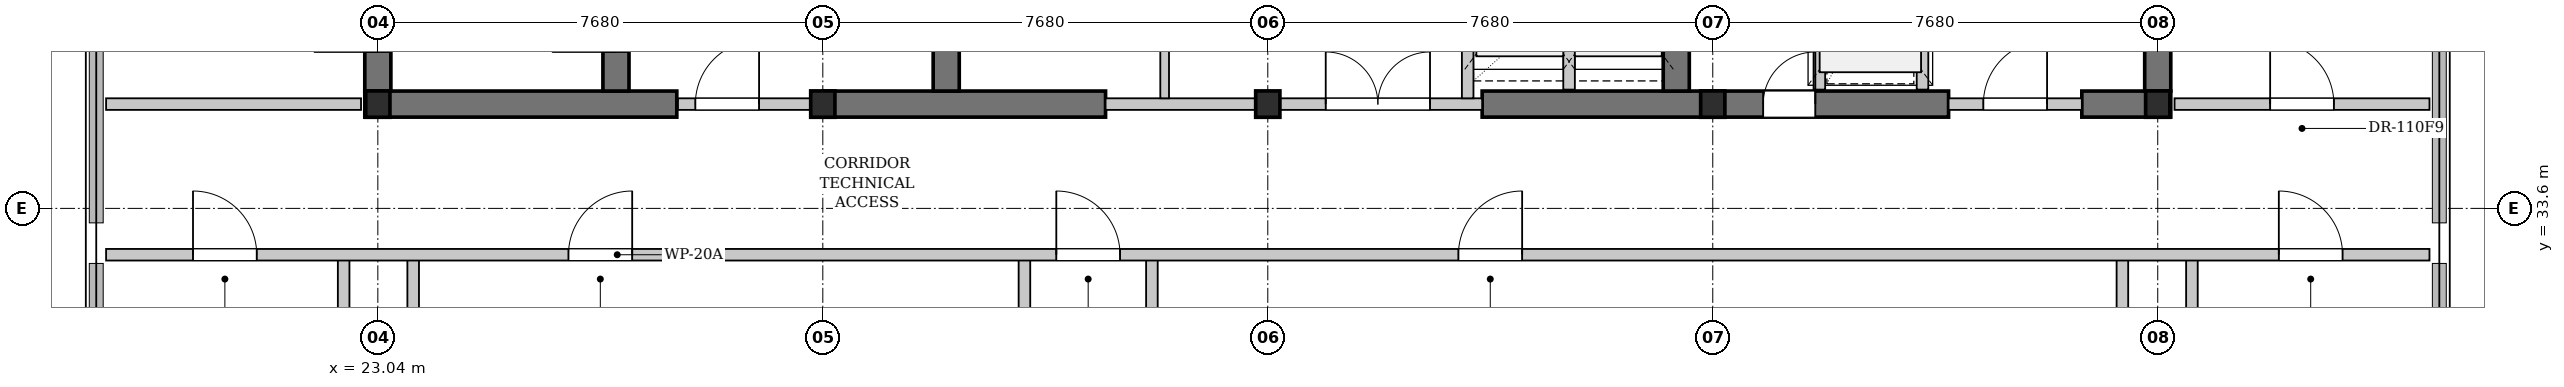
"""IFC4 building model, lengths in metres.
Left out: names, types, materials, properties, quantities, classifications, styles, units other than length and angle.
Written with IfcOpenShell. Run it as: python <this file> out.ifc"""

import sys

from ifc_helpers import new_model, si_unit, direction, frame, frame_2d, origin, origin_2d, place, context, subcontext, project, spatial, rectangle, i_section, extrude, element, fill, save


model = new_model("IFC4")
c1 = context("Model", 3, precision=1e-05, world=origin(), true_north=direction((0.0, 1.0)))
c2 = subcontext(c1, "Body", "Model", "MODEL_VIEW")
j1 = project(units=[si_unit("LENGTHUNIT", "METRE"), si_unit("PLANEANGLEUNIT", "RADIAN")], contexts=[c1])
p1 = place(None, origin())
s1 = spatial("IfcSite", under=j1, at=p1, CompositionType="ELEMENT")
p2 = place(p1, origin())
s2 = spatial("IfcBuilding", under=s1, at=p2, CompositionType="ELEMENT")
p3 = place(p2, frame((0.0, 0.0, 191.9)))
s3 = spatial("IfcBuildingStorey", under=s2, at=p3, CompositionType="ELEMENT", Elevation=191.9)
p4 = place(p3, frame((22.815, 35.4, 0.0), z_axis=(0.0, 0.0, 1.0), x_axis=(1.0, 0.0, 0.0)))
e1 = element("IfcWall", 1, at=p4, inside=s3, PredefinedType="SHEAR", context=c2, shape_type="SweptSolid", body=[
    extrude(rectangle(XDim=5.385, YDim=0.45, at=frame_2d((2.692, 0.0))), origin(), (0.0, 0.0, 1.0), 3.98),
])
p5 = place(p3, frame((30.72, 35.4, 0.0), z_axis=(0.0, 0.0, 1.0), x_axis=(1.0, 0.0, 0.0)))
e2 = element("IfcWall", 2, at=p5, inside=s3, PredefinedType="SHEAR", context=c2, shape_type="SweptSolid", body=[
    extrude(rectangle(XDim=4.88, YDim=0.45, at=frame_2d((2.44, 0.0))), origin(), (0.0, 0.0, 1.0), 3.98),
])
p6 = place(p3, frame((42.1, 35.4, 0.0), z_axis=(0.0, 0.0, 1.0), x_axis=(1.0, 0.0, 0.0)))
e3 = element("IfcWall", 3, at=p6, inside=s3, PredefinedType="SHEAR", context=c2, shape_type="SweptSolid", body=[
    extrude(rectangle(XDim=8.05, YDim=0.45, at=frame_2d((4.025, 0.0))), origin(), (0.0, 0.0, 1.0), 3.98),
])
p7 = place(p6, frame((4.85, 0.0, 0.0)))
e4 = element("IfcOpeningElement", 4, at=p7, cuts=e3, PredefinedType="OPENING", context=c2, shape_type="SweptSolid", body=[
    extrude(rectangle(XDim=0.9, YDim=2.15, at=frame_2d((0.45, 1.075))), frame((0.0, 0.235, 0.0), z_axis=(0.0, -1.0, 0.0), x_axis=(1.0, 0.0, 0.0)), (0.0, 0.0, 1.0), 0.47),
])
p8 = place(p3, frame((52.45, 35.4, 0.0), z_axis=(0.0, 0.0, 1.0), x_axis=(1.0, 0.0, 0.0)))
e5 = element("IfcWall", 5, at=p8, inside=s3, PredefinedType="SHEAR", context=c2, shape_type="SweptSolid", body=[
    extrude(rectangle(XDim=1.535, YDim=0.45, at=frame_2d((0.768, 0.0))), origin(), (0.0, 0.0, 1.0), 3.98),
])
p9 = place(p3, frame((23.04, 35.625, 0.0), z_axis=(0.0, 0.0, 1.0), x_axis=(0.0, 1.0, 0.0)))
e6 = element("IfcWall", 6, at=p9, inside=s3, PredefinedType="SHEAR", context=c2, shape_type="SweptSolid", body=[
    extrude(rectangle(XDim=10.35, YDim=0.45, at=frame_2d((5.175, 0.0))), origin(), (0.0, 0.0, 1.0), 3.98),
])
p10 = place(p9, frame((0.675, 0.0, 0.0)))
e7 = element("IfcOpeningElement", 7, at=p10, cuts=e6, PredefinedType="OPENING", context=c2, shape_type="SweptSolid", body=[
    extrude(rectangle(XDim=1.1, YDim=2.15, at=frame_2d((0.55, 1.075))), frame((0.0, 0.235, 0.0), z_axis=(0.0, -1.0, 0.0), x_axis=(1.0, 0.0, 0.0)), (0.0, 0.0, 1.0), 0.47),
])
p11 = place(p3, frame((27.15, 35.625, 0.0), z_axis=(0.0, 0.0, 1.0), x_axis=(0.0, 1.0, 0.0)))
e8 = element("IfcWall", 8, at=p11, inside=s3, PredefinedType="SHEAR", context=c2, shape_type="SweptSolid", body=[
    extrude(rectangle(XDim=10.35, YDim=0.45, at=frame_2d((5.175, 0.0))), origin(), (0.0, 0.0, 1.0), 3.98),
])
p12 = place(p11, frame((0.675, 0.0, 0.0)))
e9 = element("IfcOpeningElement", 9, at=p12, cuts=e8, PredefinedType="OPENING", context=c2, shape_type="SweptSolid", body=[
    extrude(rectangle(XDim=1.1, YDim=2.15, at=frame_2d((0.55, 1.075))), frame((0.0, 0.235, 0.0), z_axis=(0.0, -1.0, 0.0), x_axis=(1.0, 0.0, 0.0)), (0.0, 0.0, 1.0), 0.47),
])
for number, where, z_axis, x_axis in (
    (10, (32.85, 35.625, 0.0), (0.0, 0.0, 1.0), (0.0, 1.0, 0.0)),
    (11, (45.45, 35.625, 0.0), (0.0, 0.0, 1.0), (0.0, 1.0, 0.0)),
    (12, (53.76, 35.625, 0.0), (0.0, 0.0, 1.0), (0.0, 1.0, 0.0)),
):
    element("IfcWall", number, at=place(p3, frame(where, z_axis=z_axis, x_axis=x_axis)), inside=s3, PredefinedType="SHEAR", context=c2, shape_type="SweptSolid", body=[
        extrude(rectangle(XDim=10.35, YDim=0.45, at=frame_2d((5.175, 0.0))), origin(), (0.0, 0.0, 1.0), 3.98),
    ])
for number, where, z_axis, x_axis in (
    (13, (23.04, 35.4, 0.0), (0.0, 0.0, 1.0), (1.0, 0.0, 0.0)),
    (14, (30.72, 35.4, 0.0), (0.0, 0.0, 1.0), (1.0, 0.0, 0.0)),
    (15, (38.4, 35.4, 0.0), (0.0, 0.0, 1.0), (1.0, 0.0, 0.0)),
    (16, (46.08, 35.4, 0.0), (0.0, 0.0, 1.0), (1.0, 0.0, 0.0)),
    (17, (53.76, 35.4, 0.0), (0.0, 0.0, 1.0), (1.0, 0.0, 0.0)),
):
    element("IfcColumn", number, at=place(p3, frame(where, z_axis=z_axis, x_axis=x_axis)), inside=s3, PredefinedType="COLUMN", context=c2, shape_type="SweptSolid", body=[
        extrude(i_section(OverallWidth=0.418, OverallDepth=0.455, WebThickness=0.042, FlangeThickness=0.068, FilletRadius=0.015, at=origin_2d()), origin(), (0.0, 0.0, 1.0), 4.2),
    ])
p13 = place(p3, frame((28.22, 35.4, 0.0), z_axis=(0.0, 0.0, 1.0), x_axis=(1.0, 0.0, 0.0)))
e18 = element("IfcWall", 18, at=p13, inside=s3, PredefinedType="PARTITIONING", context=c2, shape_type="SweptSolid", body=[
    extrude(rectangle(XDim=2.5, YDim=0.2, at=frame_2d((1.25, 0.0))), origin(), (0.0, 0.0, 1.0), 3.161),
])
p14 = place(p13, frame((0.3, 0.0, 0.0)))
e19 = element("IfcOpeningElement", 19, at=p14, cuts=e18, PredefinedType="OPENING", context=c2, shape_type="SweptSolid", body=[
    extrude(rectangle(XDim=1.1, YDim=2.15, at=frame_2d((0.55, 1.075))), frame((0.0, 0.11, 0.0), z_axis=(0.0, -1.0, 0.0), x_axis=(1.0, 0.0, 0.0)), (0.0, 0.0, 1.0), 0.22),
])
p15 = place(p3, frame((35.6, 35.4, 0.0), z_axis=(0.0, 0.0, 1.0), x_axis=(1.0, 0.0, 0.0)))
e20 = element("IfcWall", 20, at=p15, inside=s3, PredefinedType="PARTITIONING", context=c2, shape_type="SweptSolid", body=[
    extrude(rectangle(XDim=6.5, YDim=0.2, at=frame_2d((3.25, 0.0))), origin(), (0.0, 0.0, 1.0), 3.161),
])
p16 = place(p15, frame((3.8, 0.0, 0.0)))
e21 = element("IfcOpeningElement", 21, at=p16, cuts=e20, PredefinedType="OPENING", context=c2, shape_type="SweptSolid", body=[
    extrude(rectangle(XDim=1.8, YDim=2.3, at=frame_2d((0.9, 1.15))), frame((0.0, 0.11, 0.0), z_axis=(0.0, -1.0, 0.0), x_axis=(1.0, 0.0, 0.0)), (0.0, 0.0, 1.0), 0.22),
])
p17 = place(p3, frame((36.62, 35.5, 0.0), z_axis=(0.0, 0.0, 1.0), x_axis=(0.0, 1.0, 0.0)))
e22 = element("IfcWall", 22, at=p17, inside=s3, PredefinedType="PARTITIONING", context=c2, shape_type="SweptSolid", body=[
    extrude(rectangle(XDim=10.42, YDim=0.15, at=frame_2d((5.21, 0.0))), origin(), (0.0, 0.0, 1.0), 3.98),
])
p18 = place(p17, frame((3.92, 0.0, 0.0)))
e23 = element("IfcOpeningElement", 23, at=p18, cuts=e22, PredefinedType="OPENING", context=c2, shape_type="SweptSolid", body=[
    extrude(rectangle(XDim=0.9, YDim=2.15, at=frame_2d((0.45, 1.075))), frame((0.0, 0.085, 0.0), z_axis=(0.0, -1.0, 0.0), x_axis=(1.0, 0.0, 0.0)), (0.0, 0.0, 1.0), 0.17),
])
p19 = place(p17, frame((5.85, 0.0, 0.0)))
e24 = element("IfcOpeningElement", 24, at=p19, cuts=e22, PredefinedType="OPENING", context=c2, shape_type="SweptSolid", body=[
    extrude(rectangle(XDim=0.9, YDim=2.15, at=frame_2d((0.45, 1.075))), frame((0.0, 0.085, 0.0), z_axis=(0.0, -1.0, 0.0), x_axis=(1.0, 0.0, 0.0)), (0.0, 0.0, 1.0), 0.17),
])
p20 = place(p3, frame((43.6, 35.65, 0.0), z_axis=(0.0, 0.0, 1.0), x_axis=(0.0, 1.0, 0.0)))
e25 = element("IfcWall", 25, at=p20, inside=s3, PredefinedType="PARTITIONING", context=c2, shape_type="SweptSolid", body=[
    extrude(rectangle(XDim=3.25, YDim=0.2, at=frame_2d((1.625, 0.0))), origin(), (0.0, 0.0, 1.0), 3.98),
])
p21 = place(p3, frame((41.85, 35.5, 0.0), z_axis=(0.0, 0.0, 1.0), x_axis=(0.0, 1.0, 0.0)))
e26 = element("IfcWall", 26, at=p21, inside=s3, PredefinedType="PARTITIONING", context=c2, shape_type="SweptSolid", body=[
    extrude(rectangle(XDim=3.4, YDim=0.2, at=frame_2d((1.7, 0.0))), origin(), (0.0, 0.0, 1.0), 3.98),
])
p22 = place(p3, frame((50.15, 35.4, 0.0), z_axis=(0.0, 0.0, 1.0), x_axis=(1.0, 0.0, 0.0)))
e27 = element("IfcWall", 27, at=p22, inside=s3, PredefinedType="PARTITIONING", context=c2, shape_type="SweptSolid", body=[
    extrude(rectangle(XDim=2.3, YDim=0.2, at=frame_2d((1.15, 0.0))), origin(), (0.0, 0.0, 1.0), 3.161),
])
p23 = place(p22, frame((0.6, 0.0, 0.0)))
e28 = element("IfcOpeningElement", 28, at=p23, cuts=e27, PredefinedType="OPENING", context=c2, shape_type="SweptSolid", body=[
    extrude(rectangle(XDim=1.1, YDim=2.15, at=frame_2d((0.55, 1.075))), frame((0.0, 0.11, 0.0), z_axis=(0.0, -1.0, 0.0), x_axis=(1.0, 0.0, 0.0)), (0.0, 0.0, 1.0), 0.22),
])
p24 = place(p3, frame((49.7, 35.65, 0.0), z_axis=(0.0, 0.0, 1.0), x_axis=(0.0, 1.0, 0.0)))
e29 = element("IfcWall", 29, at=p24, inside=s3, PredefinedType="PARTITIONING", context=c2, shape_type="SweptSolid", body=[
    extrude(rectangle(XDim=3.15, YDim=0.2, at=frame_2d((1.575, 0.0))), origin(), (0.0, 0.0, 1.0), 3.98),
])
p25 = place(p24, frame((0.85, 0.0, 0.0)))
e30 = element("IfcOpeningElement", 30, at=p25, cuts=e29, PredefinedType="OPENING", context=c2, shape_type="SweptSolid", body=[
    extrude(rectangle(XDim=1.2, YDim=2.2, at=frame_2d((0.6, 1.1))), frame((0.0, 0.11, 0.0), z_axis=(0.0, -1.0, 0.0), x_axis=(1.0, 0.0, 0.0)), (0.0, 0.0, 1.0), 0.22),
])
p26 = place(p3, frame((47.92, 35.65, 0.0), z_axis=(0.0, 0.0, 1.0), x_axis=(0.0, 1.0, 0.0)))
e31 = element("IfcWall", 31, at=p26, inside=s3, PredefinedType="PARTITIONING", context=c2, shape_type="SweptSolid", body=[
    extrude(rectangle(XDim=3.15, YDim=0.2, at=frame_2d((1.575, 0.0))), origin(), (0.0, 0.0, 1.0), 3.98),
])
p27 = place(p3, frame((18.35, 35.4, 0.0), z_axis=(0.0, 0.0, 1.0), x_axis=(1.0, 0.0, 0.0)))
e32 = element("IfcWall", 32, at=p27, inside=s3, PredefinedType="PARTITIONING", context=c2, shape_type="SweptSolid", body=[
    extrude(rectangle(XDim=4.4, YDim=0.2, at=frame_2d((2.2, 0.0))), origin(), (0.0, 0.0, 1.0), 3.98),
])
p28 = place(p3, frame((54.05, 35.4, 0.0), z_axis=(0.0, 0.0, 1.0), x_axis=(1.0, 0.0, 0.0)))
e33 = element("IfcWall", 33, at=p28, inside=s3, PredefinedType="PARTITIONING", context=c2, shape_type="SweptSolid", body=[
    extrude(rectangle(XDim=4.4, YDim=0.2, at=frame_2d((2.2, 0.0))), origin(), (0.0, 0.0, 1.0), 3.98),
])
p29 = place(p28, frame((1.65, 0.0, 0.0)))
e34 = element("IfcOpeningElement", 34, at=p29, cuts=e33, PredefinedType="OPENING", context=c2, shape_type="SweptSolid", body=[
    extrude(rectangle(XDim=1.1, YDim=2.15, at=frame_2d((0.55, 1.075))), frame((0.0, 0.11, 0.0), z_axis=(0.0, -1.0, 0.0), x_axis=(1.0, 0.0, 0.0)), (0.0, 0.0, 1.0), 0.22),
])
for number, where, z_axis, x_axis in (
    (35, (22.45, 23.58, 0.0), (0.0, 0.0, 1.0), (0.0, 1.0, 0.0)),
    (36, (23.65, 23.58, 0.0), (0.0, 0.0, 1.0), (0.0, 1.0, 0.0)),
    (37, (53.15, 23.58, 0.0), (0.0, 0.0, 1.0), (0.0, 1.0, 0.0)),
    (38, (54.35, 23.58, 0.0), (0.0, 0.0, 1.0), (0.0, 1.0, 0.0)),
):
    element("IfcWall", number, at=place(p3, frame(where, z_axis=z_axis, x_axis=x_axis)), inside=s3, PredefinedType="PARTITIONING", context=c2, shape_type="SweptSolid", body=[
        extrude(rectangle(XDim=9.22, YDim=0.2, at=frame_2d((4.61, 0.0))), origin(), (0.0, 0.0, 1.0), 3.98),
    ])
for number, where, z_axis, x_axis in (
    (39, (34.2, 24.85, 0.0), (0.0, 0.0, 1.0), (0.0, 1.0, 0.0)),
    (40, (36.4, 24.85, 0.0), (0.0, 0.0, 1.0), (0.0, 1.0, 0.0)),
):
    element("IfcWall", number, at=place(p3, frame(where, z_axis=z_axis, x_axis=x_axis)), inside=s3, PredefinedType="PARTITIONING", context=c2, shape_type="SweptSolid", body=[
        extrude(rectangle(XDim=7.95, YDim=0.2, at=frame_2d((3.975, 0.0))), origin(), (0.0, 0.0, 1.0), 3.98),
    ])
p30 = place(p3, frame((18.35, 32.8, 0.0), z_axis=(0.0, 0.0, 1.0), x_axis=(1.0, 0.0, 0.0)))
e41 = element("IfcWall", 41, at=p30, inside=s3, PredefinedType="PARTITIONING", context=c2, shape_type="SweptSolid", body=[
    extrude(rectangle(XDim=40.1, YDim=0.2, at=frame_2d((20.05, 0.0))), origin(), (0.0, 0.0, 1.0), 3.98),
])
p31 = place(p30, frame((1.5, 0.0, 0.0)))
e42 = element("IfcOpeningElement", 42, at=p31, cuts=e41, PredefinedType="OPENING", context=c2, shape_type="SweptSolid", body=[
    extrude(rectangle(XDim=1.1, YDim=2.15, at=frame_2d((0.55, 1.075))), frame((0.0, 0.11, 0.0), z_axis=(0.0, -1.0, 0.0), x_axis=(1.0, 0.0, 0.0)), (0.0, 0.0, 1.0), 0.22),
])
p32 = place(p30, frame((7.98, 0.0, 0.0)))
e43 = element("IfcOpeningElement", 43, at=p32, cuts=e41, PredefinedType="OPENING", context=c2, shape_type="SweptSolid", body=[
    extrude(rectangle(XDim=1.1, YDim=2.15, at=frame_2d((0.55, 1.075))), frame((0.0, 0.11, 0.0), z_axis=(0.0, -1.0, 0.0), x_axis=(1.0, 0.0, 0.0)), (0.0, 0.0, 1.0), 0.22),
])
p33 = place(p30, frame((16.4, 0.0, 0.0)))
e44 = element("IfcOpeningElement", 44, at=p33, cuts=e41, PredefinedType="OPENING", context=c2, shape_type="SweptSolid", body=[
    extrude(rectangle(XDim=1.1, YDim=2.15, at=frame_2d((0.55, 1.075))), frame((0.0, 0.11, 0.0), z_axis=(0.0, -1.0, 0.0), x_axis=(1.0, 0.0, 0.0)), (0.0, 0.0, 1.0), 0.22),
])
p34 = place(p30, frame((23.34, 0.0, 0.0)))
e45 = element("IfcOpeningElement", 45, at=p34, cuts=e41, PredefinedType="OPENING", context=c2, shape_type="SweptSolid", body=[
    extrude(rectangle(XDim=1.1, YDim=2.15, at=frame_2d((0.55, 1.075))), frame((0.0, 0.11, 0.0), z_axis=(0.0, -1.0, 0.0), x_axis=(1.0, 0.0, 0.0)), (0.0, 0.0, 1.0), 0.22),
])
p35 = place(p30, frame((37.5, 0.0, 0.0)))
e46 = element("IfcOpeningElement", 46, at=p35, cuts=e41, PredefinedType="OPENING", context=c2, shape_type="SweptSolid", body=[
    extrude(rectangle(XDim=1.1, YDim=2.15, at=frame_2d((0.55, 1.075))), frame((0.0, 0.11, 0.0), z_axis=(0.0, -1.0, 0.0), x_axis=(1.0, 0.0, 0.0)), (0.0, 0.0, 1.0), 0.22),
])
p36 = place(p14, origin())
e47 = element("IfcDoor", 47, at=p36, inside=s3, OperationType="SINGLE_SWING_RIGHT", PredefinedType="DOOR", context=c2, shape_type="SweptSolid", body=[
    extrude(rectangle(XDim=1.1, YDim=2.15, at=frame_2d((0.55, 1.075))), frame((0.0, 0.025, 0.0), z_axis=(0.0, -1.0, 0.0), x_axis=(1.0, 0.0, 0.0)), (0.0, 0.0, 1.0), 0.05),
])
fill(e19, e47)
p37 = place(p16, origin())
e48 = element("IfcDoor", 48, at=p37, inside=s3, OperationType="DOUBLE_DOOR_SINGLE_SWING", PredefinedType="DOOR", context=c2, shape_type="SweptSolid", body=[
    extrude(rectangle(XDim=1.8, YDim=2.3, at=frame_2d((0.9, 1.15))), frame((0.0, 0.025, 0.0), z_axis=(0.0, -1.0, 0.0), x_axis=(1.0, 0.0, 0.0)), (0.0, 0.0, 1.0), 0.05),
])
fill(e21, e48)
p38 = place(p23, origin())
e49 = element("IfcDoor", 49, at=p38, inside=s3, OperationType="SINGLE_SWING_RIGHT", PredefinedType="DOOR", context=c2, shape_type="SweptSolid", body=[
    extrude(rectangle(XDim=1.1, YDim=2.15, at=frame_2d((0.55, 1.075))), frame((0.0, 0.025, 0.0), z_axis=(0.0, -1.0, 0.0), x_axis=(1.0, 0.0, 0.0)), (0.0, 0.0, 1.0), 0.05),
])
fill(e28, e49)
p39 = place(p29, origin())
e50 = element("IfcDoor", 50, at=p39, inside=s3, OperationType="SINGLE_SWING_LEFT", PredefinedType="DOOR", context=c2, shape_type="SweptSolid", body=[
    extrude(rectangle(XDim=1.1, YDim=2.15, at=frame_2d((0.55, 1.075))), frame((0.0, 0.025, 0.0), z_axis=(0.0, -1.0, 0.0), x_axis=(1.0, 0.0, 0.0)), (0.0, 0.0, 1.0), 0.05),
])
fill(e34, e50)
p40 = place(p31, origin())
e51 = element("IfcDoor", 51, at=p40, inside=s3, OperationType="SINGLE_SWING_LEFT", PredefinedType="DOOR", context=c2, shape_type="SweptSolid", body=[
    extrude(rectangle(XDim=1.1, YDim=2.15, at=frame_2d((0.55, 1.075))), frame((0.0, 0.025, 0.0), z_axis=(0.0, -1.0, 0.0), x_axis=(1.0, 0.0, 0.0)), (0.0, 0.0, 1.0), 0.05),
])
fill(e42, e51)
p41 = place(p32, origin())
e52 = element("IfcDoor", 52, at=p41, inside=s3, OperationType="SINGLE_SWING_RIGHT", PredefinedType="DOOR", context=c2, shape_type="SweptSolid", body=[
    extrude(rectangle(XDim=1.1, YDim=2.15, at=frame_2d((0.55, 1.075))), frame((0.0, 0.025, 0.0), z_axis=(0.0, -1.0, 0.0), x_axis=(1.0, 0.0, 0.0)), (0.0, 0.0, 1.0), 0.05),
])
fill(e43, e52)
p42 = place(p33, origin())
e53 = element("IfcDoor", 53, at=p42, inside=s3, OperationType="SINGLE_SWING_LEFT", PredefinedType="DOOR", context=c2, shape_type="SweptSolid", body=[
    extrude(rectangle(XDim=1.1, YDim=2.15, at=frame_2d((0.55, 1.075))), frame((0.0, 0.025, 0.0), z_axis=(0.0, -1.0, 0.0), x_axis=(1.0, 0.0, 0.0)), (0.0, 0.0, 1.0), 0.05),
])
fill(e44, e53)
p43 = place(p34, origin())
e54 = element("IfcDoor", 54, at=p43, inside=s3, OperationType="SINGLE_SWING_RIGHT", PredefinedType="DOOR", context=c2, shape_type="SweptSolid", body=[
    extrude(rectangle(XDim=1.1, YDim=2.15, at=frame_2d((0.55, 1.075))), frame((0.0, 0.025, 0.0), z_axis=(0.0, -1.0, 0.0), x_axis=(1.0, 0.0, 0.0)), (0.0, 0.0, 1.0), 0.05),
])
fill(e45, e54)
p44 = place(p35, origin())
e55 = element("IfcDoor", 55, at=p44, inside=s3, OperationType="SINGLE_SWING_LEFT", PredefinedType="DOOR", context=c2, shape_type="SweptSolid", body=[
    extrude(rectangle(XDim=1.1, YDim=2.15, at=frame_2d((0.55, 1.075))), frame((0.0, 0.025, 0.0), z_axis=(0.0, -1.0, 0.0), x_axis=(1.0, 0.0, 0.0)), (0.0, 0.0, 1.0), 0.05),
])
fill(e46, e55)
p45 = place(p7, origin())
e56 = element("IfcDoor", 56, at=p45, inside=s3, OperationType="SINGLE_SWING_RIGHT", PredefinedType="DOOR", context=c2, shape_type="SweptSolid", body=[
    extrude(rectangle(XDim=0.9, YDim=2.15, at=frame_2d((0.45, 1.075))), frame((0.0, 0.025, 0.0), z_axis=(0.0, -1.0, 0.0), x_axis=(1.0, 0.0, 0.0)), (0.0, 0.0, 1.0), 0.05),
])
fill(e4, e56)
save(model, sys.argv[1])
